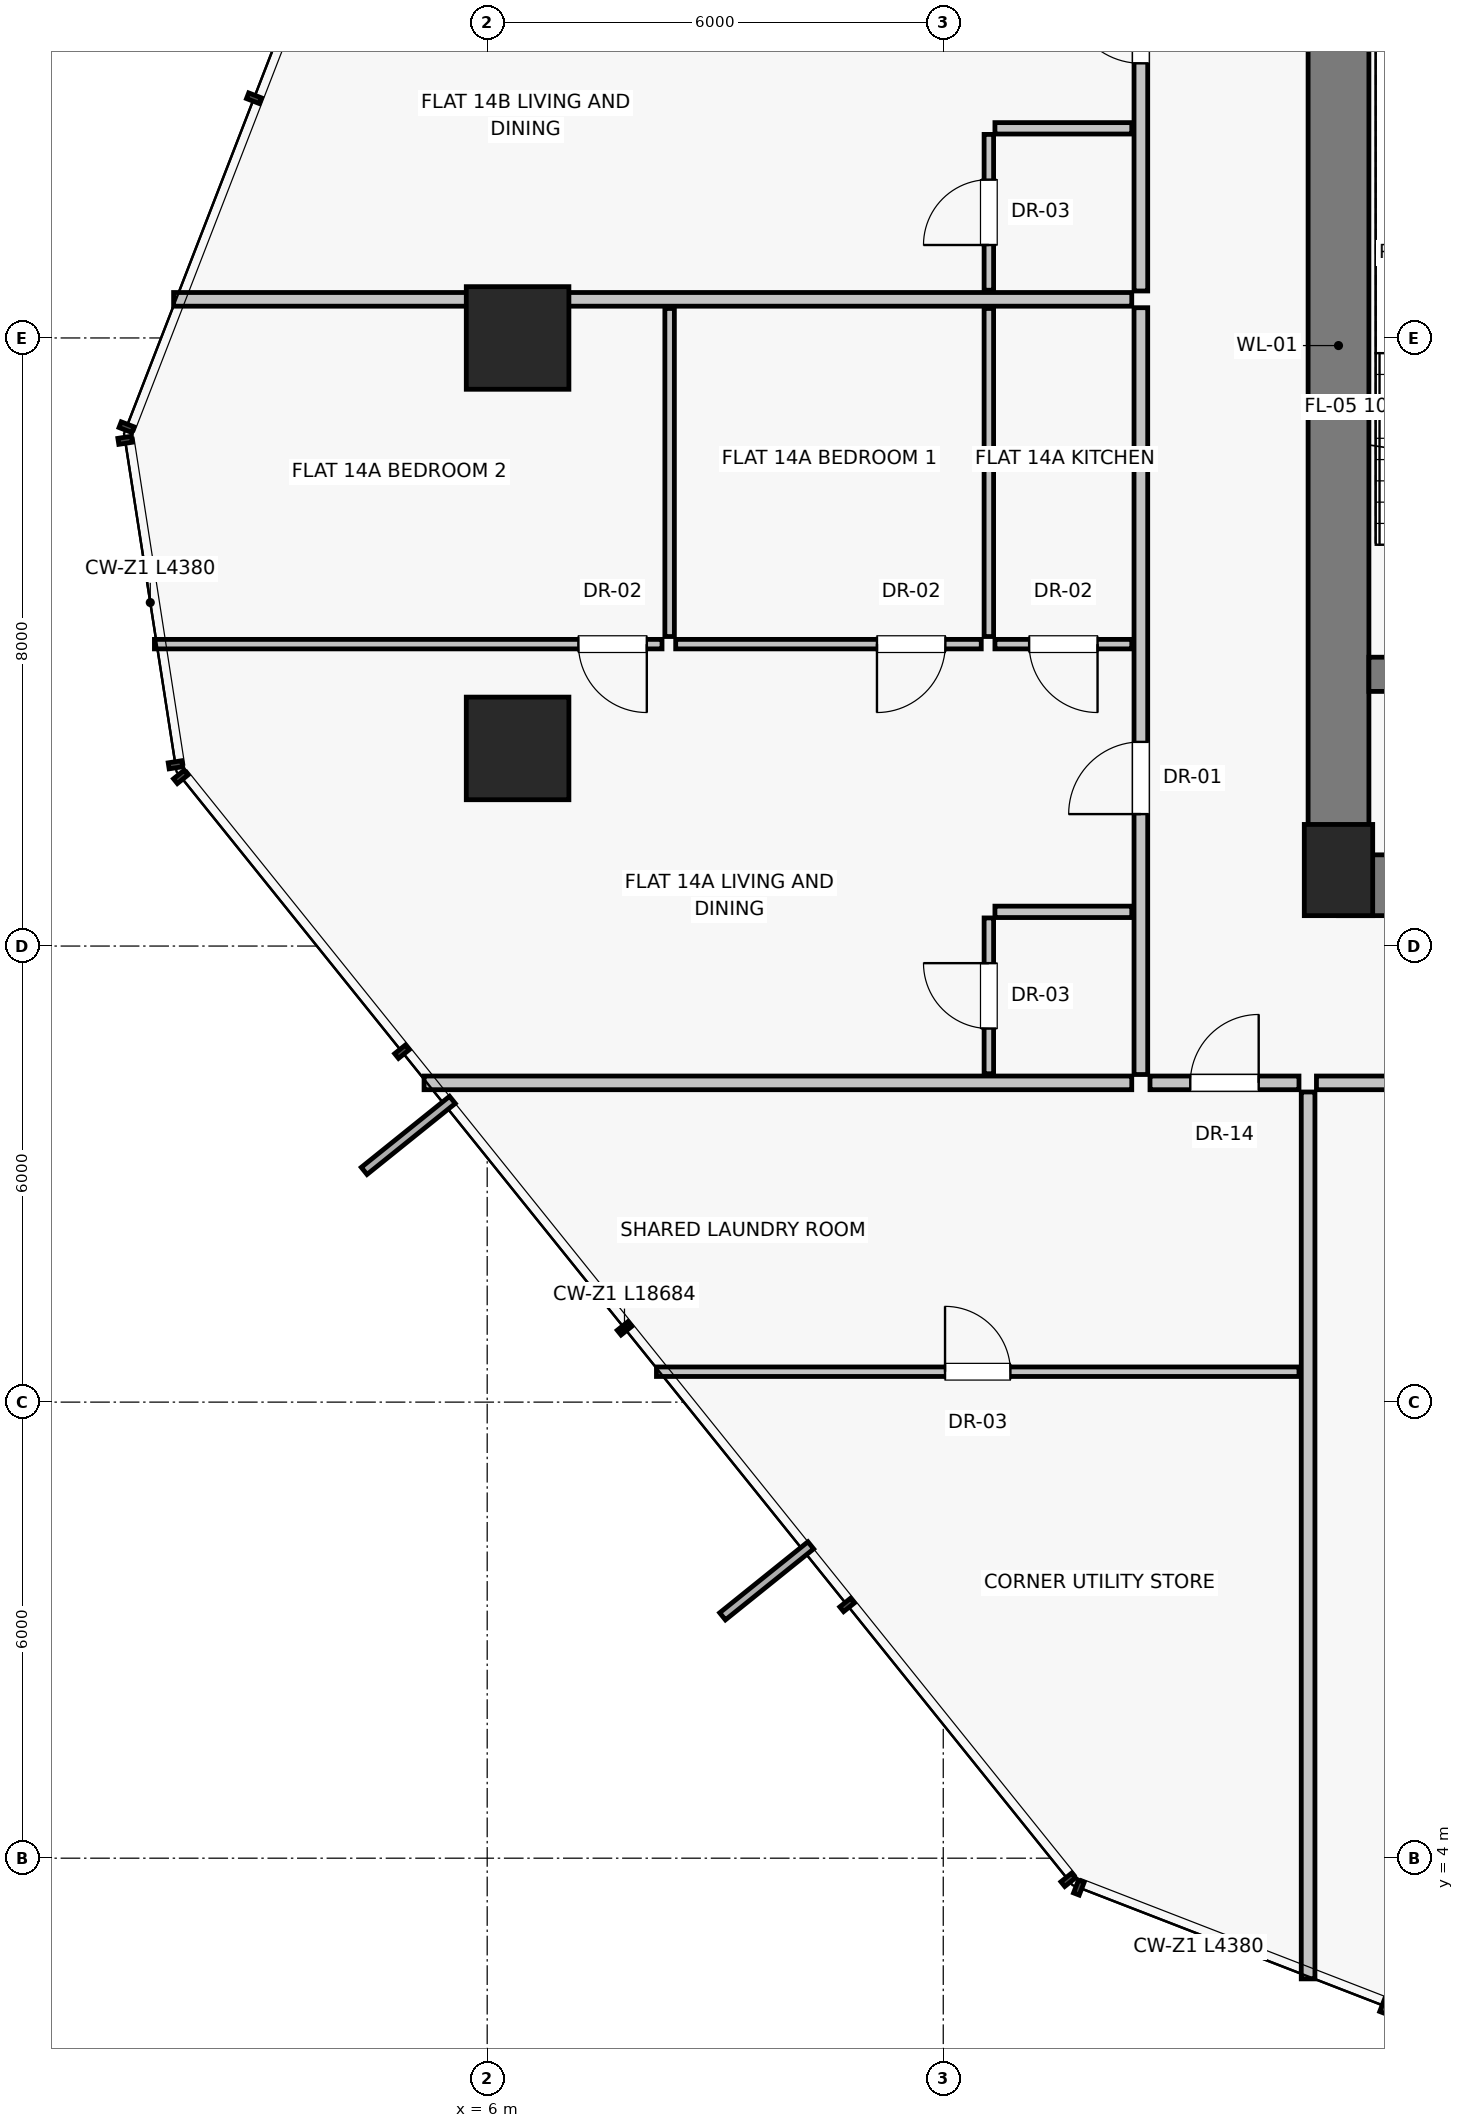
"""IFC4 building model, lengths in metres.
Left out: names, types, materials, properties, quantities, classifications, styles, units other than length and angle.
Written with IfcOpenShell. Run it as: python <this file> out.ifc"""

import sys

from ifc_helpers import new_model, si_unit, direction, frame, frame_2d, origin, origin_2d, place, context, subcontext, project, spatial, rectangle, extrude, source, transform, mapped, element, fill, save


model = new_model("IFC4")
c1 = context("Model", 3, precision=1e-05, world=origin(), true_north=direction((0.0, 1.0)))
c2 = subcontext(c1, "Body", "Model", "MODEL_VIEW")
j1 = project(units=[si_unit("LENGTHUNIT", "METRE"), si_unit("PLANEANGLEUNIT", "RADIAN")], contexts=[c1])
p1 = place(None, origin())
s1 = spatial("IfcSite", under=j1, at=p1, CompositionType="ELEMENT")
p2 = place(p1, origin())
s2 = spatial("IfcBuilding", under=s1, at=p2, CompositionType="ELEMENT")
p3 = place(p2, frame((0.0, 0.0, 53.3)))
s3 = spatial("IfcBuildingStorey", under=s2, at=p3, CompositionType="ELEMENT", Elevation=53.3)
p4 = place(p3, frame((17.2, 17.0, 0.0), z_axis=(0.0, 0.0, 1.0), x_axis=(1.0, 0.0, 0.0)))
e1 = element("IfcColumn", 1, at=p4, inside=s3, PredefinedType="PILASTER", context=c2, shape_type="SweptSolid", body=[
    extrude(rectangle(XDim=0.9, YDim=1.2, at=origin_2d()), origin(), (0.0, 0.0, 1.0), 3.25),
])
for number, where, z_axis, x_axis in (
    (2, (6.4, 24.0, 0.0), (0.0, 0.0, 1.0), (1.0, 0.0, 0.0)),
    (3, (6.4, 18.6, 0.0), (0.0, 0.0, 1.0), (1.0, 0.0, 0.0)),
):
    element("IfcColumn", number, at=place(p3, frame(where, z_axis=z_axis, x_axis=x_axis)), inside=s3, PredefinedType="COLUMN", context=c2, shape_type="SweptSolid", body=[
        extrude(rectangle(XDim=1.35, YDim=1.35, at=origin_2d()), origin(), (0.0, 0.0, 1.0), 3.25),
    ])
p5 = place(p3, frame((17.2, 16.8, 0.0), z_axis=(0.0, 0.0, 1.0), x_axis=(0.0, 1.0, 0.0)))
e4 = element("IfcWall", 4, at=p5, inside=s3, PredefinedType="SHEAR", context=c2, shape_type="SweptSolid", body=[
    extrude(rectangle(XDim=14.2, YDim=0.8, at=frame_2d((7.1, 0.0))), origin(), (0.0, 0.0, 1.0), 2.97),
])
p6 = place(p3, frame((17.2, 16.8, 0.0), z_axis=(0.0, 0.0, 1.0), x_axis=(1.0, 0.0, 0.0)))
e5 = element("IfcWall", 5, at=p6, inside=s3, PredefinedType="SHEAR", context=c2, shape_type="SweptSolid", body=[
    extrude(rectangle(XDim=5.85, YDim=0.8, at=frame_2d((2.925, 0.0))), origin(), (0.0, 0.0, 1.0), 2.97),
])
p7 = place(p6, frame((1.15, 0.0, 0.0)))
e6 = element("IfcOpeningElement", 6, at=p7, cuts=e5, PredefinedType="OPENING", context=c2, shape_type="SweptSolid", body=[
    extrude(rectangle(XDim=1.2, YDim=2.03, at=frame_2d((0.6, 1.015))), frame((0.0, 0.41, 0.0), z_axis=(0.0, -1.0, 0.0), x_axis=(1.0, 0.0, 0.0)), (0.0, 0.0, 1.0), 0.82),
])
p8 = place(p3, frame((17.6, 19.575, 0.0), z_axis=(0.0, 0.0, 1.0), x_axis=(1.0, 0.0, 0.0)))
e7 = element("IfcWall", 7, at=p8, inside=s3, PredefinedType="SHEAR", context=c2, shape_type="SweptSolid", body=[
    extrude(rectangle(XDim=3.425, YDim=0.45, at=frame_2d((1.712, 0.0))), origin(), (0.0, 0.0, 1.0), 2.97),
])
p9 = place(p8, frame((1.05, 0.0, 0.0)))
e8 = element("IfcOpeningElement", 8, at=p9, cuts=e7, PredefinedType="OPENING", context=c2, shape_type="SweptSolid", body=[
    extrude(rectangle(XDim=1.1, YDim=2.03, at=frame_2d((0.55, 1.015))), frame((0.0, 0.235, 0.0), z_axis=(0.0, -1.0, 0.0), x_axis=(1.0, 0.0, 0.0)), (0.0, 0.0, 1.0), 0.47),
])
p10 = place(p3, frame((16.8, 14.08, 0.0), z_axis=(0.0, 0.0, 1.0), x_axis=(0.0, -1.0, 0.0)))
e9 = element("IfcWall", 9, at=p10, inside=s3, PredefinedType="PARTITIONING", context=c2, shape_type="SweptSolid", body=[
    extrude(rectangle(XDim=11.668, YDim=0.18, at=frame_2d((5.834, 0.0))), origin(), (0.0, 0.0, 1.0), 2.97),
])
p11 = place(p3, frame((16.91, 14.2, 0.0), z_axis=(0.0, 0.0, 1.0), x_axis=(1.0, 0.0, 0.0)))
e10 = element("IfcWall", 10, at=p11, inside=s3, PredefinedType="PARTITIONING", context=c2, shape_type="SweptSolid", body=[
    extrude(rectangle(XDim=7.238, YDim=0.18, at=frame_2d((3.619, 0.0))), origin(), (0.0, 0.0, 1.0), 2.97),
])
p12 = place(p11, frame((2.719, 0.0, 0.0)))
e11 = element("IfcOpeningElement", 11, at=p12, cuts=e10, PredefinedType="OPENING", context=c2, shape_type="SweptSolid", body=[
    extrude(rectangle(XDim=1.8, YDim=2.25, at=frame_2d((0.9, 1.125))), frame((0.0, 0.1, 0.0), z_axis=(0.0, -1.0, 0.0), x_axis=(1.0, 0.0, 0.0)), (0.0, 0.0, 1.0), 0.2),
])
p13 = place(p3, frame((14.48, 14.2, 0.0), z_axis=(0.0, 0.0, 1.0), x_axis=(-1.0, 0.0, 0.0)))
e12 = element("IfcWall", 12, at=p13, inside=s3, PredefinedType="PARTITIONING", context=c2, shape_type="SweptSolid", body=[
    extrude(rectangle(XDim=9.311, YDim=0.18, at=frame_2d((4.655, 0.0))), origin(), (0.0, 0.0, 1.0), 2.97),
])
p14 = place(p3, frame((14.6, 14.31, 0.0), z_axis=(0.0, 0.0, 1.0), x_axis=(0.0, 1.0, 0.0)))
e13 = element("IfcWall", 13, at=p14, inside=s3, PredefinedType="PARTITIONING", context=c2, shape_type="SweptSolid", body=[
    extrude(rectangle(XDim=10.088, YDim=0.18, at=frame_2d((5.044, 0.0))), origin(), (0.0, 0.0, 1.0), 2.97),
])
p15 = place(p14, frame((3.426, 0.0, 0.0)))
e14 = element("IfcOpeningElement", 14, at=p15, cuts=e13, PredefinedType="OPENING", context=c2, shape_type="SweptSolid", body=[
    extrude(rectangle(XDim=0.95, YDim=2.02, at=frame_2d((0.475, 1.01))), frame((0.0, 0.1, 0.0), z_axis=(0.0, -1.0, 0.0), x_axis=(1.0, 0.0, 0.0)), (0.0, 0.0, 1.0), 0.2),
])
p16 = place(p3, frame((14.48, 16.45, 0.0), z_axis=(0.0, 0.0, 1.0), x_axis=(-1.0, 0.0, 0.0)))
e15 = element("IfcWall", 15, at=p16, inside=s3, PredefinedType="PARTITIONING", context=c2, shape_type="SweptSolid", body=[
    extrude(rectangle(XDim=1.8, YDim=0.15, at=frame_2d((0.9, 0.0))), origin(), (0.0, 0.0, 1.0), 2.97),
])
p17 = place(p3, frame((12.6, 14.32, 0.0), z_axis=(0.0, 0.0, 1.0), x_axis=(0.0, 1.0, 0.0)))
e16 = element("IfcWall", 16, at=p17, inside=s3, PredefinedType="PARTITIONING", context=c2, shape_type="SweptSolid", body=[
    extrude(rectangle(XDim=2.05, YDim=0.125, at=frame_2d((1.025, 0.0))), origin(), (0.0, 0.0, 1.0), 2.97),
])
p18 = place(p17, frame((0.595, 0.0, 0.0)))
e17 = element("IfcOpeningElement", 17, at=p18, cuts=e16, PredefinedType="OPENING", context=c2, shape_type="SweptSolid", body=[
    extrude(rectangle(XDim=0.86, YDim=2.01, at=frame_2d((0.43, 1.005))), frame((0.0, 0.073, 0.0), z_axis=(0.0, -1.0, 0.0), x_axis=(1.0, 0.0, 0.0)), (0.0, 0.0, 1.0), 0.145),
])
p19 = place(p3, frame((14.48, 19.972, 0.0), z_axis=(0.0, 0.0, 1.0), x_axis=(-1.0, 0.0, 0.0)))
e18 = element("IfcWall", 18, at=p19, inside=s3, PredefinedType="PARTITIONING", context=c2, shape_type="SweptSolid", body=[
    extrude(rectangle(XDim=1.8, YDim=0.125, at=frame_2d((0.9, 0.0))), origin(), (0.0, 0.0, 1.0), 2.97),
])
p20 = place(p19, frame((0.45, 0.0, 0.0)))
e19 = element("IfcOpeningElement", 19, at=p20, cuts=e18, PredefinedType="OPENING", context=c2, shape_type="SweptSolid", body=[
    extrude(rectangle(XDim=0.9, YDim=2.01, at=frame_2d((0.45, 1.005))), frame((0.0, 0.073, 0.0), z_axis=(0.0, -1.0, 0.0), x_axis=(1.0, 0.0, 0.0)), (0.0, 0.0, 1.0), 0.145),
])
for number, where, z_axis, x_axis in (
    (20, (12.6, 20.072, 0.0), (0.0, 0.0, 1.0), (0.0, 1.0, 0.0)),
    (21, (8.4, 20.072, 0.0), (0.0, 0.0, 1.0), (0.0, 1.0, 0.0)),
):
    element("IfcWall", number, at=place(p3, frame(where, z_axis=z_axis, x_axis=x_axis)), inside=s3, PredefinedType="PARTITIONING", context=c2, shape_type="SweptSolid", body=[
        extrude(rectangle(XDim=4.316, YDim=0.125, at=frame_2d((2.158, 0.0))), origin(), (0.0, 0.0, 1.0), 2.97),
    ])
p21 = place(p3, frame((12.5, 19.972, 0.0), z_axis=(0.0, 0.0, 1.0), x_axis=(-1.0, 0.0, 0.0)))
e22 = element("IfcWall", 22, at=p21, inside=s3, PredefinedType="PARTITIONING", context=c2, shape_type="SweptSolid", body=[
    extrude(rectangle(XDim=4.02, YDim=0.125, at=frame_2d((2.01, 0.0))), origin(), (0.0, 0.0, 1.0), 2.97),
])
p22 = place(p21, frame((0.472, 0.0, 0.0)))
e23 = element("IfcOpeningElement", 23, at=p22, cuts=e22, PredefinedType="OPENING", context=c2, shape_type="SweptSolid", body=[
    extrude(rectangle(XDim=0.9, YDim=2.01, at=frame_2d((0.45, 1.005))), frame((0.0, 0.073, 0.0), z_axis=(0.0, -1.0, 0.0), x_axis=(1.0, 0.0, 0.0)), (0.0, 0.0, 1.0), 0.145),
])
p23 = place(p3, frame((8.3, 19.972, 0.0), z_axis=(0.0, 0.0, 1.0), x_axis=(-1.0, 0.0, 0.0)))
e24 = element("IfcWall", 24, at=p23, inside=s3, PredefinedType="PARTITIONING", context=c2, shape_type="SweptSolid", body=[
    extrude(rectangle(XDim=6.678, YDim=0.125, at=frame_2d((3.339, 0.0))), origin(), (0.0, 0.0, 1.0), 2.97),
])
p24 = place(p23, frame((0.2, 0.0, 0.0)))
e25 = element("IfcOpeningElement", 25, at=p24, cuts=e24, PredefinedType="OPENING", context=c2, shape_type="SweptSolid", body=[
    extrude(rectangle(XDim=0.9, YDim=2.01, at=frame_2d((0.45, 1.005))), frame((0.0, 0.073, 0.0), z_axis=(0.0, -1.0, 0.0), x_axis=(1.0, 0.0, 0.0)), (0.0, 0.0, 1.0), 0.145),
])
p25 = place(p3, frame((14.48, 24.508, 0.0), z_axis=(0.0, 0.0, 1.0), x_axis=(-1.0, 0.0, 0.0)))
e26 = element("IfcWall", 26, at=p25, inside=s3, PredefinedType="PARTITIONING", context=c2, shape_type="SweptSolid", body=[
    extrude(rectangle(XDim=12.605, YDim=0.18, at=frame_2d((6.303, 0.0))), origin(), (0.0, 0.0, 1.0), 2.97),
])
p26 = place(p3, frame((14.6, 24.618, 0.0), z_axis=(0.0, 0.0, 1.0), x_axis=(0.0, 1.0, 0.0)))
e27 = element("IfcWall", 27, at=p26, inside=s3, PredefinedType="PARTITIONING", context=c2, shape_type="SweptSolid", body=[
    extrude(rectangle(XDim=8.872, YDim=0.18, at=frame_2d((4.436, 0.0))), origin(), (0.0, 0.0, 1.0), 2.97),
])
p27 = place(p26, frame((2.995, 0.0, 0.0)))
e28 = element("IfcOpeningElement", 28, at=p27, cuts=e27, PredefinedType="OPENING", context=c2, shape_type="SweptSolid", body=[
    extrude(rectangle(XDim=0.95, YDim=2.02, at=frame_2d((0.475, 1.01))), frame((0.0, 0.1, 0.0), z_axis=(0.0, -1.0, 0.0), x_axis=(1.0, 0.0, 0.0)), (0.0, 0.0, 1.0), 0.2),
])
p28 = place(p3, frame((14.48, 26.758, 0.0), z_axis=(0.0, 0.0, 1.0), x_axis=(-1.0, 0.0, 0.0)))
e29 = element("IfcWall", 29, at=p28, inside=s3, PredefinedType="PARTITIONING", context=c2, shape_type="SweptSolid", body=[
    extrude(rectangle(XDim=1.8, YDim=0.15, at=frame_2d((0.9, 0.0))), origin(), (0.0, 0.0, 1.0), 2.97),
])
p29 = place(p3, frame((12.6, 24.628, 0.0), z_axis=(0.0, 0.0, 1.0), x_axis=(0.0, 1.0, 0.0)))
e30 = element("IfcWall", 30, at=p29, inside=s3, PredefinedType="PARTITIONING", context=c2, shape_type="SweptSolid", body=[
    extrude(rectangle(XDim=2.05, YDim=0.125, at=frame_2d((1.025, 0.0))), origin(), (0.0, 0.0, 1.0), 2.97),
])
p30 = place(p29, frame((0.595, 0.0, 0.0)))
e31 = element("IfcOpeningElement", 31, at=p30, cuts=e30, PredefinedType="OPENING", context=c2, shape_type="SweptSolid", body=[
    extrude(rectangle(XDim=0.86, YDim=2.01, at=frame_2d((0.43, 1.005))), frame((0.0, 0.073, 0.0), z_axis=(0.0, -1.0, 0.0), x_axis=(1.0, 0.0, 0.0)), (0.0, 0.0, 1.0), 0.145),
])
p31 = place(p3, frame((14.72, 14.2, 0.0), z_axis=(0.0, 0.0, 1.0), x_axis=(1.0, 0.0, 0.0)))
e32 = element("IfcWall", 32, at=p31, inside=s3, PredefinedType="PARTITIONING", context=c2, shape_type="SweptSolid", body=[
    extrude(rectangle(XDim=1.96, YDim=0.18, at=frame_2d((0.98, 0.0))), origin(), (0.0, 0.0, 1.0), 2.97),
])
p32 = place(p31, frame((0.53, 0.0, 0.0)))
e33 = element("IfcOpeningElement", 33, at=p32, cuts=e32, PredefinedType="OPENING", context=c2, shape_type="SweptSolid", body=[
    extrude(rectangle(XDim=0.9, YDim=2.01, at=frame_2d((0.45, 1.005))), frame((0.0, 0.1, 0.0), z_axis=(0.0, -1.0, 0.0), x_axis=(1.0, 0.0, 0.0)), (0.0, 0.0, 1.0), 0.2),
])
p33 = place(p3, frame((8.227, 10.4, 0.0), z_axis=(0.0, 0.0, 1.0), x_axis=(1.0, 0.0, 0.0)))
e34 = element("IfcWall", 34, at=p33, inside=s3, PredefinedType="PARTITIONING", context=c2, shape_type="SweptSolid", body=[
    extrude(rectangle(XDim=8.453, YDim=0.125, at=frame_2d((4.227, 0.0))), origin(), (0.0, 0.0, 1.0), 2.97),
])
p34 = place(p33, frame((3.796, 0.0, 0.0)))
e35 = element("IfcOpeningElement", 35, at=p34, cuts=e34, PredefinedType="OPENING", context=c2, shape_type="SweptSolid", body=[
    extrude(rectangle(XDim=0.86, YDim=2.01, at=frame_2d((0.43, 1.005))), frame((0.0, 0.073, 0.0), z_axis=(0.0, -1.0, 0.0), x_axis=(1.0, 0.0, 0.0)), (0.0, 0.0, 1.0), 0.145),
])
m1 = source(origin(), c2, "Body", "SweptSolid", [
    extrude(rectangle(XDim=0.95, YDim=2.02, at=frame_2d((0.475, 1.01))), frame((0.0, 0.025, 0.0), z_axis=(0.0, -1.0, 0.0), x_axis=(1.0, 0.0, 0.0)), (0.0, 0.0, 1.0), 0.05),
])
p35 = place(p15, origin())
e36 = element("IfcDoor", 36, at=p35, inside=s3, OperationType="SINGLE_SWING_LEFT", PredefinedType="DOOR", context=c2, shape_type="MappedRepresentation", body=[
    mapped(m1, transform((0.0, 0.0, 0.0), scale=1.0)),
])
fill(e14, e36)
m2 = source(origin(), c2, "Body", "SweptSolid", [
    extrude(rectangle(XDim=0.86, YDim=2.01, at=frame_2d((0.43, 1.005))), frame((0.0, 0.025, 0.0), z_axis=(0.0, -1.0, 0.0), x_axis=(1.0, 0.0, 0.0)), (0.0, 0.0, 1.0), 0.05),
])
p36 = place(p18, origin())
e37 = element("IfcDoor", 37, at=p36, inside=s3, OperationType="SINGLE_SWING_RIGHT", PredefinedType="DOOR", context=c2, shape_type="MappedRepresentation", body=[
    mapped(m2, transform((0.0, 0.0, 0.0), scale=1.0)),
])
fill(e17, e37)
m3 = source(origin(), c2, "Body", "SweptSolid", [
    extrude(rectangle(XDim=0.9, YDim=2.01, at=frame_2d((0.45, 1.005))), frame((0.0, 0.025, 0.0), z_axis=(0.0, -1.0, 0.0), x_axis=(1.0, 0.0, 0.0)), (0.0, 0.0, 1.0), 0.05),
])
p37 = place(p20, origin())
e38 = element("IfcDoor", 38, at=p37, inside=s3, OperationType="SINGLE_SWING_LEFT", PredefinedType="DOOR", context=c2, shape_type="MappedRepresentation", body=[
    mapped(m3, transform((0.0, 0.0, 0.0), scale=1.0)),
])
fill(e19, e38)
p38 = place(p22, origin())
e39 = element("IfcDoor", 39, at=p38, inside=s3, OperationType="SINGLE_SWING_RIGHT", PredefinedType="DOOR", context=c2, shape_type="MappedRepresentation", body=[
    mapped(m3, transform((0.0, 0.0, 0.0), scale=1.0)),
])
fill(e23, e39)
p39 = place(p24, origin())
e40 = element("IfcDoor", 40, at=p39, inside=s3, OperationType="SINGLE_SWING_LEFT", PredefinedType="DOOR", context=c2, shape_type="MappedRepresentation", body=[
    mapped(m3, transform((0.0, 0.0, 0.0), scale=1.0)),
])
fill(e25, e40)
p40 = place(p27, origin())
e41 = element("IfcDoor", 41, at=p40, inside=s3, OperationType="SINGLE_SWING_RIGHT", PredefinedType="DOOR", context=c2, shape_type="MappedRepresentation", body=[
    mapped(m1, transform((0.0, 0.0, 0.0), scale=1.0)),
])
fill(e28, e41)
p41 = place(p30, origin())
e42 = element("IfcDoor", 42, at=p41, inside=s3, OperationType="SINGLE_SWING_LEFT", PredefinedType="DOOR", context=c2, shape_type="MappedRepresentation", body=[
    mapped(m2, transform((0.0, 0.0, 0.0), scale=1.0)),
])
fill(e31, e42)
p42 = place(p32, origin())
e43 = element("IfcDoor", 43, at=p42, inside=s3, OperationType="SINGLE_SWING_RIGHT", PredefinedType="DOOR", context=c2, shape_type="MappedRepresentation", body=[
    mapped(m3, transform((0.0, 0.0, 0.0), scale=1.0)),
])
fill(e33, e43)
p43 = place(p34, origin())
e44 = element("IfcDoor", 44, at=p43, inside=s3, OperationType="SINGLE_SWING_LEFT", PredefinedType="DOOR", context=c2, shape_type="MappedRepresentation", body=[
    mapped(m2, transform((0.0, 0.0, 0.0), scale=1.0)),
])
fill(e35, e44)
save(model, sys.argv[1])
